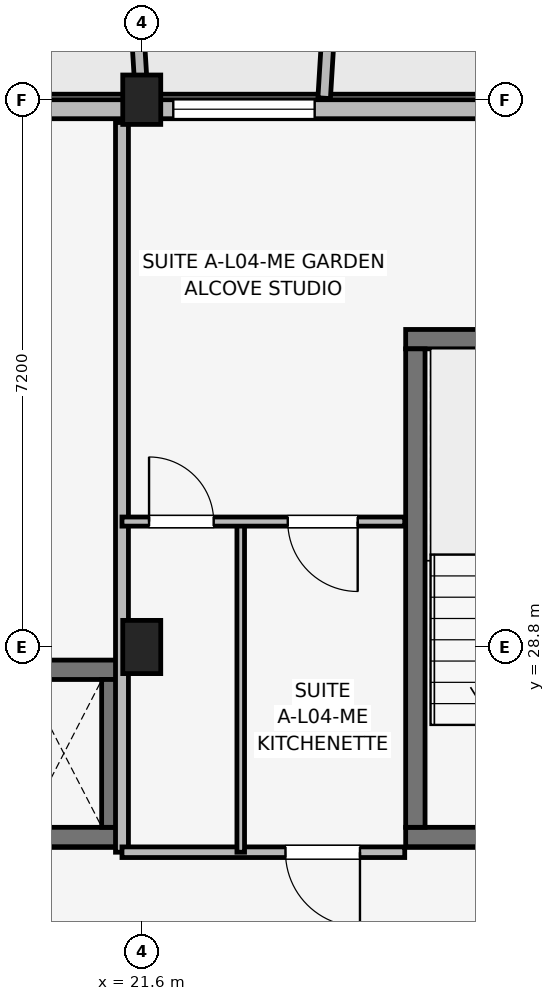
"""IFC4 building model, lengths in metres.
Left out: names, types, materials, properties, quantities, classifications, styles, units other than length and angle.
Written with IfcOpenShell. Run it as: python <this file> out.ifc"""

import sys

from ifc_helpers import new_model, si_unit, direction, frame, frame_2d, origin, origin_2d, place, context, subcontext, project, spatial, rectangle, extrude, element, fill, save


model = new_model("IFC4")
c1 = context("Model", 3, precision=1e-05, world=origin(), true_north=direction((0.0, 1.0)))
c2 = subcontext(c1, "Body", "Model", "MODEL_VIEW")
j1 = project(units=[si_unit("LENGTHUNIT", "METRE"), si_unit("PLANEANGLEUNIT", "RADIAN")], contexts=[c1])
p1 = place(None, origin())
s1 = spatial("IfcSite", under=j1, at=p1, CompositionType="ELEMENT")
p2 = place(p1, origin())
s2 = spatial("IfcBuilding", under=s1, at=p2, CompositionType="ELEMENT")
p3 = place(p2, frame((0.0, 0.0, 15.0)))
s3 = spatial("IfcBuildingStorey", under=s2, at=p3, CompositionType="ELEMENT", Elevation=15.0)
p4 = place(p3, frame((21.6, 28.8, 0.0), z_axis=(0.0, 0.0, 1.0), x_axis=(1.0, 0.0, 0.0)))
e1 = element("IfcColumn", 1, at=p4, inside=s3, PredefinedType="COLUMN", context=c2, shape_type="SweptSolid", body=[
    extrude(rectangle(XDim=0.5, YDim=0.7, at=origin_2d()), origin(), (0.0, 0.0, 1.0), 3.15),
])
p5 = place(p3, frame((21.6, 36.0, 0.0), z_axis=(0.0, 0.0, 1.0), x_axis=(1.0, 0.0, 0.0)))
e2 = element("IfcColumn", 2, at=p5, inside=s3, PredefinedType="COLUMN", context=c2, shape_type="SweptSolid", body=[
    extrude(rectangle(XDim=0.5, YDim=0.65, at=origin_2d()), origin(), (0.0, 0.0, 1.0), 3.15),
])
p6 = place(p3, frame((25.073, 26.3, 0.0), z_axis=(0.0, 0.0, 1.0), x_axis=(1.0, 0.0, 0.0)))
e3 = element("IfcWall", 3, at=p6, inside=s3, PredefinedType="SHEAR", context=c2, shape_type="SweptSolid", body=[
    extrude(rectangle(XDim=3.305, YDim=0.255, at=frame_2d((1.652, 0.0))), origin(), (0.0, 0.0, 1.0), 3.15),
])
p7 = place(p6, frame((1.127, 0.0, 0.0)))
e4 = element("IfcOpeningElement", 4, at=p7, cuts=e3, PredefinedType="OPENING", context=c2, shape_type="SweptSolid", body=[
    extrude(rectangle(XDim=1.05, YDim=2.12, at=frame_2d((0.525, 1.06))), frame((0.0, 0.137, 0.0), z_axis=(0.0, -1.0, 0.0), x_axis=(1.0, 0.0, 0.0)), (0.0, 0.0, 1.0), 0.275),
])
p8 = place(p3, frame((25.073, 32.85, 0.0), z_axis=(0.0, 0.0, 1.0), x_axis=(1.0, 0.0, 0.0)))
e5 = element("IfcWall", 5, at=p8, inside=s3, PredefinedType="SHEAR", context=c2, shape_type="SweptSolid", body=[
    extrude(rectangle(XDim=3.305, YDim=0.255, at=frame_2d((1.652, 0.0))), origin(), (0.0, 0.0, 1.0), 3.15),
])
p9 = place(p3, frame((25.2, 26.427, 0.0), z_axis=(0.0, 0.0, 1.0), x_axis=(0.0, 1.0, 0.0)))
e6 = element("IfcWall", 6, at=p9, inside=s3, PredefinedType="SHEAR", context=c2, shape_type="SweptSolid", body=[
    extrude(rectangle(XDim=6.295, YDim=0.255, at=frame_2d((3.147, 0.0))), origin(), (0.0, 0.0, 1.0), 3.15),
])
for number, where, z_axis, x_axis in (
    (7, (19.522, 26.3, 0.0), (0.0, 0.0, 1.0), (1.0, 0.0, 0.0)),
    (8, (19.522, 28.5, 0.0), (0.0, 0.0, 1.0), (1.0, 0.0, 0.0)),
):
    element("IfcWall", number, at=place(p3, frame(where, z_axis=z_axis, x_axis=x_axis)), inside=s3, PredefinedType="SHEAR", context=c2, shape_type="SweptSolid", body=[
        extrude(rectangle(XDim=1.805, YDim=0.255, at=frame_2d((0.902, 0.0))), origin(), (0.0, 0.0, 1.0), 3.15),
    ])
p10 = place(p3, frame((21.2, 26.427, 0.0), z_axis=(0.0, 0.0, 1.0), x_axis=(0.0, 1.0, 0.0)))
e9 = element("IfcWall", 9, at=p10, inside=s3, PredefinedType="SHEAR", context=c2, shape_type="SweptSolid", body=[
    extrude(rectangle(XDim=1.945, YDim=0.255, at=frame_2d((0.973, 0.0))), origin(), (0.0, 0.0, 1.0), 3.15),
])
p11 = place(p3, frame((32.6, 35.875, 0.0), z_axis=(0.0, 0.0, 1.0), x_axis=(-1.0, 0.0, 0.0)))
e10 = element("IfcWall", 10, at=p11, inside=s3, PredefinedType="SOLIDWALL", context=c2, shape_type="SweptSolid", body=[
    extrude(rectangle(XDim=29.2, YDim=0.25, at=frame_2d((14.6, 0.0))), origin(), (0.0, 0.0, 1.0), 2.43),
])
p12 = place(p11, frame((27.55, 0.0, 0.0), z_axis=(0.0, 0.0, 1.0), x_axis=(-1.0, 0.0, 0.0)))
e11 = element("IfcOpeningElement", 11, at=p12, cuts=e10, PredefinedType="OPENING", context=c2, shape_type="SweptSolid", body=[
    extrude(rectangle(XDim=1.5, YDim=2.15, at=frame_2d((0.75, 1.075))), frame((0.0, 0.135, 0.0), z_axis=(0.0, -1.0, 0.0), x_axis=(1.0, 0.0, 0.0)), (0.0, 0.0, 1.0), 0.27),
])
p13 = place(p11, frame((3.15, 0.0, 0.0), z_axis=(0.0, 0.0, 1.0), x_axis=(-1.0, 0.0, 0.0)))
e12 = element("IfcOpeningElement", 12, at=p13, cuts=e10, PredefinedType="OPENING", context=c2, shape_type="SweptSolid", body=[
    extrude(rectangle(XDim=1.5, YDim=2.15, at=frame_2d((0.75, 1.075))), frame((0.0, 0.135, 0.0), z_axis=(0.0, -1.0, 0.0), x_axis=(1.0, 0.0, 0.0)), (0.0, 0.0, 1.0), 0.27),
])
p14 = place(p11, frame((14.15, 0.0, 0.5)))
e13 = element("IfcOpeningElement", 13, at=p14, cuts=e10, PredefinedType="OPENING", context=c2, shape_type="SweptSolid", body=[
    extrude(rectangle(XDim=0.9, YDim=1.8, at=frame_2d((0.45, 0.9))), frame((0.0, 0.135, 0.0), z_axis=(0.0, -1.0, 0.0), x_axis=(1.0, 0.0, 0.0)), (0.0, 0.0, 1.0), 0.27),
])
p15 = place(p11, frame((8.725, 0.0, 0.7)))
e14 = element("IfcOpeningElement", 14, at=p15, cuts=e10, PredefinedType="OPENING", context=c2, shape_type="SweptSolid", body=[
    extrude(rectangle(XDim=1.86, YDim=1.6, at=frame_2d((0.93, 0.8))), frame((0.0, 0.135, 0.0), z_axis=(0.0, -1.0, 0.0), x_axis=(1.0, 0.0, 0.0)), (0.0, 0.0, 1.0), 0.27),
])
p16 = place(p11, frame((18.755, 0.0, 0.7)))
e15 = element("IfcOpeningElement", 15, at=p16, cuts=e10, PredefinedType="OPENING", context=c2, shape_type="SweptSolid", body=[
    extrude(rectangle(XDim=1.58, YDim=1.6, at=frame_2d((0.79, 0.8))), frame((0.0, 0.135, 0.0), z_axis=(0.0, -1.0, 0.0), x_axis=(1.0, 0.0, 0.0)), (0.0, 0.0, 1.0), 0.27),
])
p17 = place(p3, frame((21.6, 36.02, 0.0), z_axis=(0.0, 0.0, 1.0), x_axis=(-0.061170732449, 0.998127317276, 0.0)))
e16 = element("IfcWall", 16, at=p17, inside=s3, PredefinedType="ELEMENTEDWALL", context=c2, shape_type="SweptSolid", body=[
    extrude(rectangle(XDim=1.964, YDim=0.165, at=frame_2d((0.982, 0.0))), origin(), (0.0, 0.0, 1.0), 2.95),
])
p18 = place(p3, frame((24.0, 36.02, 0.0), z_axis=(0.0, 0.0, 1.0), x_axis=(0.061170732449, 0.998127317276, 0.0)))
e17 = element("IfcWall", 17, at=p18, inside=s3, PredefinedType="ELEMENTEDWALL", context=c2, shape_type="SweptSolid", body=[
    extrude(rectangle(XDim=1.964, YDim=0.165, at=frame_2d((0.982, 0.0))), origin(), (0.0, 0.0, 1.0), 2.48),
])
p19 = place(p3, frame((21.34, 26.1, 0.0), z_axis=(0.0, 0.0, 1.0), x_axis=(0.0, 1.0, 0.0)))
e18 = element("IfcWall", 18, at=p19, inside=s3, PredefinedType="PARTITIONING", context=c2, shape_type="SweptSolid", body=[
    extrude(rectangle(XDim=9.6, YDim=0.17, at=frame_2d((4.8, 0.0))), origin(), (0.0, 0.0, 1.0), 2.38),
])
p20 = place(p3, frame((21.34, 26.1, 0.0), z_axis=(0.0, 0.0, 1.0), x_axis=(1.0, 0.0, 0.0)))
e19 = element("IfcWall", 19, at=p20, inside=s3, PredefinedType="PARTITIONING", context=c2, shape_type="SweptSolid", body=[
    extrude(rectangle(XDim=3.72, YDim=0.14, at=frame_2d((1.86, 0.0))), origin(), (0.0, 0.0, 1.0), 2.38),
])
p21 = place(p20, frame((3.131, 0.0, 0.0), z_axis=(0.0, 0.0, 1.0), x_axis=(-1.0, 0.0, 0.0)))
e20 = element("IfcOpeningElement", 20, at=p21, cuts=e19, PredefinedType="OPENING", context=c2, shape_type="SweptSolid", body=[
    extrude(rectangle(XDim=0.98, YDim=2.1, at=frame_2d((0.49, 1.05))), frame((0.0, 0.08, 0.0), z_axis=(0.0, -1.0, 0.0), x_axis=(1.0, 0.0, 0.0)), (0.0, 0.0, 1.0), 0.16),
])
p22 = place(p3, frame((22.902, 26.1, 0.0), z_axis=(0.0, 0.0, 1.0), x_axis=(0.0, 1.0, 0.0)))
e21 = element("IfcWall", 21, at=p22, inside=s3, PredefinedType="PARTITIONING", context=c2, shape_type="SweptSolid", body=[
    extrude(rectangle(XDim=4.35, YDim=0.1, at=frame_2d((2.175, 0.0))), origin(), (0.0, 0.0, 1.0), 2.375),
])
p23 = place(p3, frame((21.34, 30.45, 0.0), z_axis=(0.0, 0.0, 1.0), x_axis=(1.0, 0.0, 0.0)))
e22 = element("IfcWall", 22, at=p23, inside=s3, PredefinedType="PARTITIONING", context=c2, shape_type="SweptSolid", body=[
    extrude(rectangle(XDim=3.72, YDim=0.12, at=frame_2d((1.86, 0.0))), origin(), (0.0, 0.0, 1.0), 2.38),
])
p24 = place(p23, frame((0.356, 0.0, 0.0)))
e23 = element("IfcOpeningElement", 23, at=p24, cuts=e22, PredefinedType="OPENING", context=c2, shape_type="SweptSolid", body=[
    extrude(rectangle(XDim=0.85, YDim=2.08, at=frame_2d((0.425, 1.04))), frame((0.0, 0.07, 0.0), z_axis=(0.0, -1.0, 0.0), x_axis=(1.0, 0.0, 0.0)), (0.0, 0.0, 1.0), 0.14),
])
p25 = place(p23, frame((3.101, 0.0, 0.0), z_axis=(0.0, 0.0, 1.0), x_axis=(-1.0, 0.0, 0.0)))
e24 = element("IfcOpeningElement", 24, at=p25, cuts=e22, PredefinedType="OPENING", context=c2, shape_type="SweptSolid", body=[
    extrude(rectangle(XDim=0.92, YDim=2.08, at=frame_2d((0.46, 1.04))), frame((0.0, 0.07, 0.0), z_axis=(0.0, -1.0, 0.0), x_axis=(1.0, 0.0, 0.0)), (0.0, 0.0, 1.0), 0.14),
])
p26 = place(p15, origin())
e25 = element("IfcWindow", 25, at=p26, inside=s3, PartitioningType="SINGLE_PANEL", PredefinedType="WINDOW", context=c2, shape_type="SweptSolid", body=[
    extrude(rectangle(XDim=1.86, YDim=1.6, at=frame_2d((0.93, 0.8))), frame((0.0, 0.03, 0.0), z_axis=(0.0, -1.0, 0.0), x_axis=(1.0, 0.0, 0.0)), (0.0, 0.0, 1.0), 0.06),
])
fill(e14, e25)
p27 = place(p21, origin())
e26 = element("IfcDoor", 26, at=p27, inside=s3, OperationType="SINGLE_SWING_RIGHT", PredefinedType="DOOR", context=c2, shape_type="SweptSolid", body=[
    extrude(rectangle(XDim=0.98, YDim=2.1, at=frame_2d((0.49, 1.05))), frame((0.0, 0.025, 0.0), z_axis=(0.0, -1.0, 0.0), x_axis=(1.0, 0.0, 0.0)), (0.0, 0.0, 1.0), 0.05),
])
fill(e20, e26)
p28 = place(p24, origin())
e27 = element("IfcDoor", 27, at=p28, inside=s3, OperationType="SINGLE_SWING_LEFT", PredefinedType="DOOR", context=c2, shape_type="SweptSolid", body=[
    extrude(rectangle(XDim=0.85, YDim=2.08, at=frame_2d((0.425, 1.04))), frame((0.0, 0.025, 0.0), z_axis=(0.0, -1.0, 0.0), x_axis=(1.0, 0.0, 0.0)), (0.0, 0.0, 1.0), 0.05),
])
fill(e23, e27)
p29 = place(p25, origin())
e28 = element("IfcDoor", 28, at=p29, inside=s3, OperationType="SINGLE_SWING_RIGHT", PredefinedType="DOOR", context=c2, shape_type="SweptSolid", body=[
    extrude(rectangle(XDim=0.92, YDim=2.08, at=frame_2d((0.46, 1.04))), frame((0.0, 0.025, 0.0), z_axis=(0.0, -1.0, 0.0), x_axis=(1.0, 0.0, 0.0)), (0.0, 0.0, 1.0), 0.05),
])
fill(e24, e28)
save(model, sys.argv[1])
